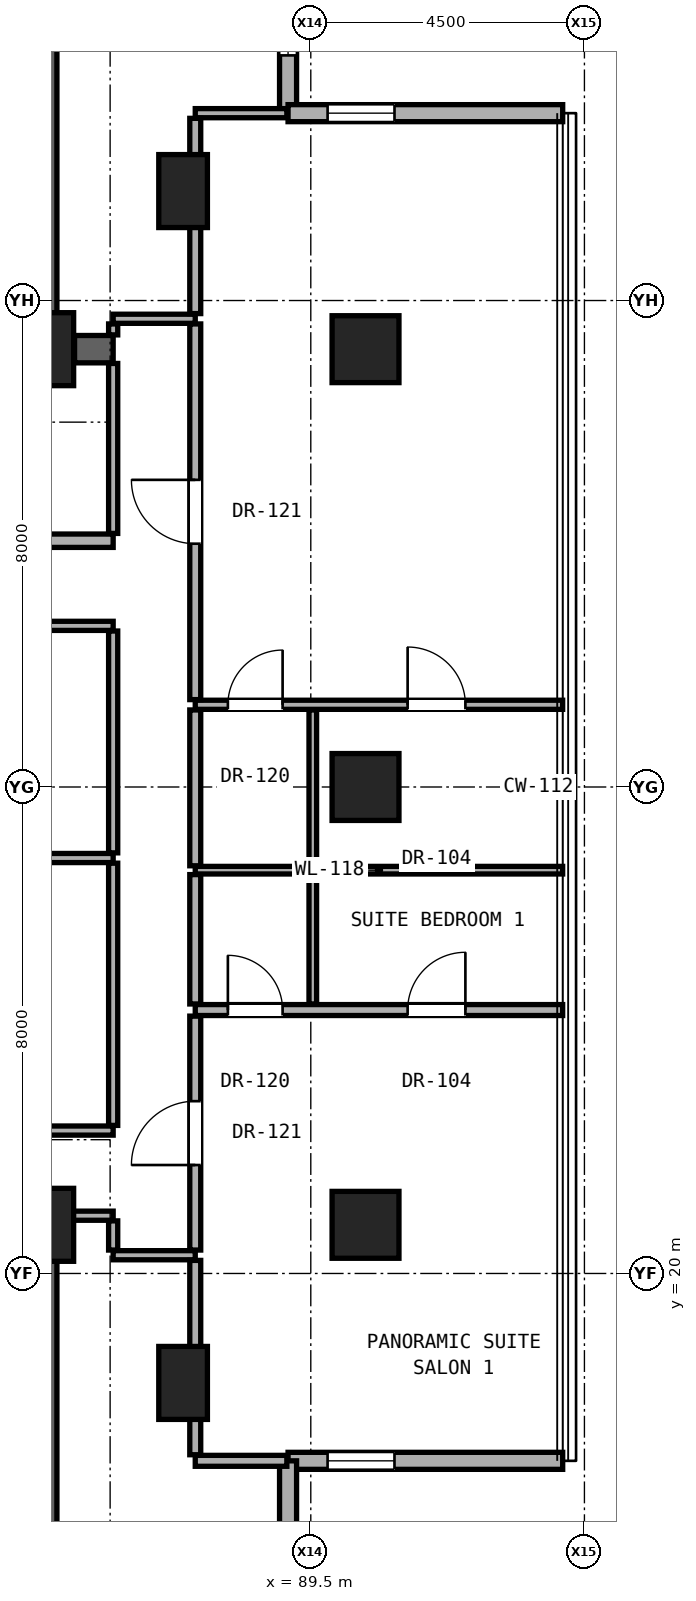
"""IFC4 building model, lengths in metres.
Left out: names, types, materials, properties, quantities, classifications, styles, units other than length and angle.
Written with IfcOpenShell. Run it as: python <this file> out.ifc"""

import sys

from ifc_helpers import new_model, si_unit, direction, frame, frame_2d, origin, origin_2d, place, context, subcontext, project, spatial, rectangle, hollow_rectangle, extrude, element, fill, save


model = new_model("IFC4")
c1 = context("Model", 3, precision=1e-05, world=origin(), true_north=direction((0.0, 1.0)))
c2 = subcontext(c1, "Body", "Model", "MODEL_VIEW")
j1 = project(units=[si_unit("LENGTHUNIT", "METRE"), si_unit("PLANEANGLEUNIT", "RADIAN")], contexts=[c1])
p1 = place(None, origin())
s1 = spatial("IfcSite", under=j1, at=p1, CompositionType="ELEMENT")
p2 = place(p1, origin())
s2 = spatial("IfcBuilding", under=s1, at=p2, CompositionType="ELEMENT")
p3 = place(p2, frame((0.0, 0.0, 88.4)))
s3 = spatial("IfcBuildingStorey", under=s2, at=p3, CompositionType="ELEMENT", Elevation=88.4)
for number, where, z_axis, x_axis in (
    (1, (85.0, 20.8, 0.0), (0.0, 0.0, 1.0), (1.0, 0.0, 0.0)),
    (2, (85.0, 35.2, 0.0), (0.0, 0.0, 1.0), (1.0, 0.0, 0.0)),
):
    element("IfcColumn", number, at=place(p3, frame(where, z_axis=z_axis, x_axis=x_axis)), inside=s3, PredefinedType="COLUMN", context=c2, shape_type="SweptSolid", body=[
        extrude(rectangle(XDim=1.2, YDim=1.2, at=origin_2d()), origin(), (0.0, 0.0, 1.0), 3.3),
    ])
for number, where, z_axis, x_axis in (
    (3, (90.4, 20.8, 0.0), (0.0, 0.0, 1.0), (1.0, 0.0, 0.0)),
    (4, (90.4, 28.0, 0.0), (0.0, 0.0, 1.0), (1.0, 0.0, 0.0)),
    (5, (90.4, 35.2, 0.0), (0.0, 0.0, 1.0), (1.0, 0.0, 0.0)),
):
    element("IfcColumn", number, at=place(p3, frame(where, z_axis=z_axis, x_axis=x_axis)), inside=s3, PredefinedType="COLUMN", context=c2, shape_type="SweptSolid", body=[
        extrude(hollow_rectangle(XDim=1.1, YDim=1.1, WallThickness=0.06, at=origin_2d()), origin(), (0.0, 0.0, 1.0), 3.3),
    ])
for number, where, z_axis, x_axis in (
    (6, (87.4, 18.2, 0.0), (0.0, 0.0, 1.0), (1.0, 0.0, 0.0)),
    (7, (87.4, 37.8, 0.0), (0.0, 0.0, 1.0), (1.0, 0.0, 0.0)),
):
    element("IfcColumn", number, at=place(p3, frame(where, z_axis=z_axis, x_axis=x_axis)), inside=s3, PredefinedType="PILASTER", context=c2, shape_type="SweptSolid", body=[
        extrude(rectangle(XDim=0.8, YDim=1.2, at=origin_2d()), origin(), (0.0, 0.0, 1.0), 3.3),
    ])
for number, where, z_axis, x_axis in (
    (8, (85.0, 35.2, 0.0), (0.0, 0.0, 1.0), (0.0, 1.0, 0.0)),
    (9, (85.0, 15.2, 0.0), (0.0, 0.0, 1.0), (0.0, 1.0, 0.0)),
):
    element("IfcWall", number, at=place(p3, frame(where, z_axis=z_axis, x_axis=x_axis)), inside=s3, PredefinedType="SHEAR", context=c2, shape_type="SweptSolid", body=[
        extrude(rectangle(XDim=5.6, YDim=0.65, at=frame_2d((2.8, 0.0))), origin(), (0.0, 0.0, 1.0), 3.08),
    ])
p4 = place(p3, frame((89.126, 39.081, 0.0), z_axis=(0.0, 0.0, 1.0), x_axis=(0.0, 1.0, 0.0)))
e10 = element("IfcWall", 10, at=p4, inside=s3, PredefinedType="SOLIDWALL", context=c2, shape_type="SweptSolid", body=[
    extrude(rectangle(XDim=4.516, YDim=0.28, at=frame_2d((2.258, 0.0))), origin(), (0.0, 0.0, 1.0), 3.06),
])
p5 = place(p4, frame((0.95, 0.0, 0.85)))
e11 = element("IfcOpeningElement", 11, at=p5, cuts=e10, PredefinedType="OPENING", context=c2, shape_type="SweptSolid", body=[
    extrude(rectangle(XDim=1.1, YDim=2.0, at=frame_2d((0.55, 1.0))), frame((0.0, 0.15, 0.0), z_axis=(0.0, -1.0, 0.0), x_axis=(1.0, 0.0, 0.0)), (0.0, 0.0, 1.0), 0.3),
])
p6 = place(p3, frame((89.126, 16.919, 0.0), z_axis=(0.0, 0.0, 1.0), x_axis=(1.0, 0.0, 0.0)))
e12 = element("IfcWall", 12, at=p6, inside=s3, PredefinedType="SOLIDWALL", context=c2, shape_type="SweptSolid", body=[
    extrude(rectangle(XDim=4.516, YDim=0.28, at=frame_2d((2.258, 0.0))), origin(), (0.0, 0.0, 1.0), 3.06),
])
p7 = place(p6, frame((0.65, 0.0, 0.85)))
e13 = element("IfcOpeningElement", 13, at=p7, cuts=e12, PredefinedType="OPENING", context=c2, shape_type="SweptSolid", body=[
    extrude(rectangle(XDim=1.1, YDim=2.0, at=frame_2d((0.55, 1.0))), frame((0.0, 0.15, 0.0), z_axis=(0.0, -1.0, 0.0), x_axis=(1.0, 0.0, 0.0)), (0.0, 0.0, 1.0), 0.3),
])
p8 = place(p3, frame((89.126, 12.403, 0.0), z_axis=(0.0, 0.0, 1.0), x_axis=(0.0, 1.0, 0.0)))
e14 = element("IfcWall", 14, at=p8, inside=s3, PredefinedType="SOLIDWALL", context=c2, shape_type="SweptSolid", body=[
    extrude(rectangle(XDim=4.516, YDim=0.28, at=frame_2d((2.258, 0.0))), origin(), (0.0, 0.0, 1.0), 3.06),
])
p9 = place(p3, frame((93.643, 39.081, 0.0), z_axis=(0.0, 0.0, 1.0), x_axis=(-1.0, 0.0, 0.0)))
e15 = element("IfcWall", 15, at=p9, inside=s3, PredefinedType="SOLIDWALL", context=c2, shape_type="SweptSolid", body=[
    extrude(rectangle(XDim=4.516, YDim=0.28, at=frame_2d((2.258, 0.0))), origin(), (0.0, 0.0, 1.0), 3.06),
])
p10 = place(p9, frame((2.766, 0.0, 0.85)))
e16 = element("IfcOpeningElement", 16, at=p10, cuts=e15, PredefinedType="OPENING", context=c2, shape_type="SweptSolid", body=[
    extrude(rectangle(XDim=1.1, YDim=2.0, at=frame_2d((0.55, 1.0))), frame((0.0, 0.15, 0.0), z_axis=(0.0, -1.0, 0.0), x_axis=(1.0, 0.0, 0.0)), (0.0, 0.0, 1.0), 0.3),
])
p11 = place(p3, frame((87.6, 16.919, 0.0), z_axis=(0.0, 0.0, 1.0), x_axis=(1.0, 0.0, 0.0)))
e17 = element("IfcWall", 17, at=p11, inside=s3, PredefinedType="PARTITIONING", context=c2, shape_type="SweptSolid", body=[
    extrude(rectangle(XDim=1.506, YDim=0.18, at=frame_2d((0.753, 0.0))), origin(), (0.0, 0.0, 1.0), 3.08),
])
p12 = place(p3, frame((86.25, 20.3, 0.0), z_axis=(0.0, 0.0, 1.0), x_axis=(1.0, 0.0, 0.0)))
e18 = element("IfcWall", 18, at=p12, inside=s3, PredefinedType="PARTITIONING", context=c2, shape_type="SweptSolid", body=[
    extrude(rectangle(XDim=1.35, YDim=0.15, at=frame_2d((0.675, 0.0))), origin(), (0.0, 0.0, 1.0), 3.08),
])
p13 = place(p3, frame((85.32, 20.95, 0.0), z_axis=(0.0, 0.0, 1.0), x_axis=(1.0, 0.0, 0.0)))
e19 = element("IfcWall", 19, at=p13, inside=s3, PredefinedType="PARTITIONING", context=c2, shape_type="SweptSolid", body=[
    extrude(rectangle(XDim=0.93, YDim=0.15, at=frame_2d((0.465, 0.0))), origin(), (0.0, 0.0, 1.0), 2.472),
])
p14 = place(p3, frame((66.62, 22.35, 0.0), z_axis=(0.0, 0.0, 1.0), x_axis=(1.0, 0.0, 0.0)))
e20 = element("IfcWall", 20, at=p14, inside=s3, PredefinedType="PARTITIONING", context=c2, shape_type="SweptSolid", body=[
    extrude(rectangle(XDim=19.63, YDim=0.15, at=frame_2d((9.815, 0.0))), origin(), (0.0, 0.0, 1.0), 2.145),
])
p15 = place(p14, frame((12.085, 0.0, 0.0)))
e21 = element("IfcOpeningElement", 21, at=p15, cuts=e20, PredefinedType="OPENING", context=c2, shape_type="SweptSolid", body=[
    extrude(rectangle(XDim=0.85, YDim=2.01, at=frame_2d((0.425, 1.005))), frame((0.0, 0.085, 0.0), z_axis=(0.0, -1.0, 0.0), x_axis=(1.0, 0.0, 0.0)), (0.0, 0.0, 1.0), 0.17),
])
p16 = place(p3, frame((87.6, 24.332, 0.0), z_axis=(0.0, 0.0, 1.0), x_axis=(1.0, 0.0, 0.0)))
e22 = element("IfcWall", 22, at=p16, inside=s3, PredefinedType="PARTITIONING", context=c2, shape_type="SweptSolid", body=[
    extrude(rectangle(XDim=6.042, YDim=0.18, at=frame_2d((3.021, 0.0))), origin(), (0.0, 0.0, 1.0), 2.216),
])
p17 = place(p16, frame((3.492, 0.0, 0.0)))
e23 = element("IfcOpeningElement", 23, at=p17, cuts=e22, PredefinedType="OPENING", context=c2, shape_type="SweptSolid", body=[
    extrude(rectangle(XDim=0.95, YDim=2.15, at=frame_2d((0.475, 1.075))), frame((0.0, 0.1, 0.0), z_axis=(0.0, -1.0, 0.0), x_axis=(1.0, 0.0, 0.0)), (0.0, 0.0, 1.0), 0.2),
])
p18 = place(p16, frame((0.537, 0.0, 0.0)))
e24 = element("IfcOpeningElement", 24, at=p18, cuts=e22, PredefinedType="OPENING", context=c2, shape_type="SweptSolid", body=[
    extrude(rectangle(XDim=0.9, YDim=2.1, at=frame_2d((0.45, 1.05))), frame((0.0, 0.1, 0.0), z_axis=(0.0, -1.0, 0.0), x_axis=(1.0, 0.0, 0.0)), (0.0, 0.0, 1.0), 0.2),
])
p19 = place(p3, frame((87.6, 26.632, 0.0), z_axis=(0.0, 0.0, 1.0), x_axis=(1.0, 0.0, 0.0)))
e25 = element("IfcWall", 25, at=p19, inside=s3, PredefinedType="PARTITIONING", context=c2, shape_type="SweptSolid", body=[
    extrude(rectangle(XDim=6.042, YDim=0.125, at=frame_2d((3.021, 0.0))), origin(), (0.0, 0.0, 1.0), 2.216),
])
p20 = place(p3, frame((72.05, 26.832, 0.0), z_axis=(0.0, 0.0, 1.0), x_axis=(1.0, 0.0, 0.0)))
e26 = element("IfcWall", 26, at=p20, inside=s3, PredefinedType="PARTITIONING", context=c2, shape_type="SweptSolid", body=[
    extrude(rectangle(XDim=14.2, YDim=0.15, at=frame_2d((7.1, 0.0))), origin(), (0.0, 0.0, 1.0), 2.145),
])
p21 = place(p3, frame((87.6, 29.352, 0.0), z_axis=(0.0, 0.0, 1.0), x_axis=(1.0, 0.0, 0.0)))
e27 = element("IfcWall", 27, at=p21, inside=s3, PredefinedType="PARTITIONING", context=c2, shape_type="SweptSolid", body=[
    extrude(rectangle(XDim=6.042, YDim=0.15, at=frame_2d((3.021, 0.0))), origin(), (0.0, 0.0, 1.0), 2.216),
])
p22 = place(p21, frame((3.492, 0.0, 0.0)))
e28 = element("IfcOpeningElement", 28, at=p22, cuts=e27, PredefinedType="OPENING", context=c2, shape_type="SweptSolid", body=[
    extrude(rectangle(XDim=0.95, YDim=2.15, at=frame_2d((0.475, 1.075))), frame((0.0, 0.085, 0.0), z_axis=(0.0, -1.0, 0.0), x_axis=(1.0, 0.0, 0.0)), (0.0, 0.0, 1.0), 0.17),
])
p23 = place(p21, frame((0.537, 0.0, 0.0)))
e29 = element("IfcOpeningElement", 29, at=p23, cuts=e27, PredefinedType="OPENING", context=c2, shape_type="SweptSolid", body=[
    extrude(rectangle(XDim=0.9, YDim=2.1, at=frame_2d((0.45, 1.05))), frame((0.0, 0.085, 0.0), z_axis=(0.0, -1.0, 0.0), x_axis=(1.0, 0.0, 0.0)), (0.0, 0.0, 1.0), 0.17),
])
p24 = place(p3, frame((66.62, 30.65, 0.0), z_axis=(0.0, 0.0, 1.0), x_axis=(1.0, 0.0, 0.0)))
e30 = element("IfcWall", 30, at=p24, inside=s3, PredefinedType="PARTITIONING", context=c2, shape_type="SweptSolid", body=[
    extrude(rectangle(XDim=19.63, YDim=0.15, at=frame_2d((9.815, 0.0))), origin(), (0.0, 0.0, 1.0), 2.145),
])
p25 = place(p24, frame((3.855, 0.0, 0.0)))
e31 = element("IfcOpeningElement", 31, at=p25, cuts=e30, PredefinedType="OPENING", context=c2, shape_type="SweptSolid", body=[
    extrude(rectangle(XDim=0.85, YDim=2.01, at=frame_2d((0.425, 1.005))), frame((0.0, 0.085, 0.0), z_axis=(0.0, -1.0, 0.0), x_axis=(1.0, 0.0, 0.0)), (0.0, 0.0, 1.0), 0.17),
])
p26 = place(p24, frame((12.085, 0.0, 0.0)))
e32 = element("IfcOpeningElement", 32, at=p26, cuts=e30, PredefinedType="OPENING", context=c2, shape_type="SweptSolid", body=[
    extrude(rectangle(XDim=0.85, YDim=2.01, at=frame_2d((0.425, 1.005))), frame((0.0, 0.085, 0.0), z_axis=(0.0, -1.0, 0.0), x_axis=(1.0, 0.0, 0.0)), (0.0, 0.0, 1.0), 0.17),
])
p27 = place(p3, frame((71.55, 32.05, 0.0), z_axis=(0.0, 0.0, 1.0), x_axis=(1.0, 0.0, 0.0)))
e33 = element("IfcWall", 33, at=p27, inside=s3, PredefinedType="SOLIDWALL", context=c2, shape_type="SweptSolid", body=[
    extrude(rectangle(XDim=14.7, YDim=0.22, at=frame_2d((7.35, 0.0))), origin(), (0.0, 0.0, 1.0), 2.145),
])
p28 = place(p27, frame((11.39, 0.0, 0.0)))
e34 = element("IfcOpeningElement", 34, at=p28, cuts=e33, PredefinedType="OPENING", context=c2, shape_type="SweptSolid", body=[
    extrude(rectangle(XDim=0.85, YDim=2.01, at=frame_2d((0.425, 1.005))), frame((0.0, 0.12, 0.0), z_axis=(0.0, -1.0, 0.0), x_axis=(1.0, 0.0, 0.0)), (0.0, 0.0, 1.0), 0.24),
])
p29 = place(p27, frame((6.065, 0.0, 0.0)))
e35 = element("IfcOpeningElement", 35, at=p29, cuts=e33, PredefinedType="OPENING", context=c2, shape_type="SweptSolid", body=[
    extrude(rectangle(XDim=0.85, YDim=2.01, at=frame_2d((0.425, 1.005))), frame((0.0, 0.12, 0.0), z_axis=(0.0, -1.0, 0.0), x_axis=(1.0, 0.0, 0.0)), (0.0, 0.0, 1.0), 0.24),
])
p30 = place(p27, frame((1.65, 0.0, 0.0)))
e36 = element("IfcOpeningElement", 36, at=p30, cuts=e33, PredefinedType="OPENING", context=c2, shape_type="SweptSolid", body=[
    extrude(rectangle(XDim=0.85, YDim=2.01, at=frame_2d((0.425, 1.005))), frame((0.0, 0.12, 0.0), z_axis=(0.0, -1.0, 0.0), x_axis=(1.0, 0.0, 0.0)), (0.0, 0.0, 1.0), 0.24),
])
p31 = place(p3, frame((85.615, 35.2, 0.0), z_axis=(0.0, 0.0, 1.0), x_axis=(1.0, 0.0, 0.0)))
e37 = element("IfcWall", 37, at=p31, inside=s3, PredefinedType="SHEAR", context=c2, shape_type="SweptSolid", body=[
    extrude(rectangle(XDim=0.635, YDim=0.45, at=frame_2d((0.317, 0.0))), origin(), (0.0, 0.0, 1.0), 3.08),
])
p32 = place(p3, frame((86.25, 35.7, 0.0), z_axis=(0.0, 0.0, 1.0), x_axis=(1.0, 0.0, 0.0)))
e38 = element("IfcWall", 38, at=p32, inside=s3, PredefinedType="PARTITIONING", context=c2, shape_type="SweptSolid", body=[
    extrude(rectangle(XDim=1.35, YDim=0.15, at=frame_2d((0.675, 0.0))), origin(), (0.0, 0.0, 1.0), 3.08),
])
p33 = place(p3, frame((87.6, 39.081, 0.0), z_axis=(0.0, 0.0, 1.0), x_axis=(1.0, 0.0, 0.0)))
e39 = element("IfcWall", 39, at=p33, inside=s3, PredefinedType="PARTITIONING", context=c2, shape_type="SweptSolid", body=[
    extrude(rectangle(XDim=1.506, YDim=0.15, at=frame_2d((0.753, 0.0))), origin(), (0.0, 0.0, 1.0), 3.08),
])
p34 = place(p3, frame((86.25, 20.385, 0.0), z_axis=(0.0, 0.0, 1.0), x_axis=(0.0, 1.0, 0.0)))
e40 = element("IfcWall", 40, at=p34, inside=s3, PredefinedType="PARTITIONING", context=c2, shape_type="SweptSolid", body=[
    extrude(rectangle(XDim=0.48, YDim=0.15, at=frame_2d((0.24, 0.0))), origin(), (0.0, 0.0, 1.0), 2.472),
])
p35 = place(p3, frame((86.25, 22.435, 0.0), z_axis=(0.0, 0.0, 1.0), x_axis=(0.0, 1.0, 0.0)))
e41 = element("IfcWall", 41, at=p35, inside=s3, PredefinedType="PARTITIONING", context=c2, shape_type="SweptSolid", body=[
    extrude(rectangle(XDim=4.312, YDim=0.15, at=frame_2d((2.156, 0.0))), origin(), (0.0, 0.0, 1.0), 3.08),
])
p36 = place(p3, frame((86.25, 26.917, 0.0), z_axis=(0.0, 0.0, 1.0), x_axis=(0.0, 1.0, 0.0)))
e42 = element("IfcWall", 42, at=p36, inside=s3, PredefinedType="PARTITIONING", context=c2, shape_type="SweptSolid", body=[
    extrude(rectangle(XDim=3.648, YDim=0.15, at=frame_2d((1.824, 0.0))), origin(), (0.0, 0.0, 1.0), 2.299),
])
p37 = place(p3, frame((86.25, 32.17, 0.0), z_axis=(0.0, 0.0, 1.0), x_axis=(0.0, 1.0, 0.0)))
e43 = element("IfcWall", 43, at=p37, inside=s3, PredefinedType="PARTITIONING", context=c2, shape_type="SweptSolid", body=[
    extrude(rectangle(XDim=2.795, YDim=0.15, at=frame_2d((1.397, 0.0))), origin(), (0.0, 0.0, 1.0), 2.472),
])
p38 = place(p3, frame((86.25, 35.435, 0.0), z_axis=(0.0, 0.0, 1.0), x_axis=(0.0, 1.0, 0.0)))
e44 = element("IfcWall", 44, at=p38, inside=s3, PredefinedType="PARTITIONING", context=c2, shape_type="SweptSolid", body=[
    extrude(rectangle(XDim=0.18, YDim=0.15, at=frame_2d((0.09, 0.0))), origin(), (0.0, 0.0, 1.0), 2.472),
])
p39 = place(p3, frame((87.6, 17.019, 0.0), z_axis=(0.0, 0.0, 1.0), x_axis=(0.0, 1.0, 0.0)))
e45 = element("IfcWall", 45, at=p39, inside=s3, PredefinedType="PARTITIONING", context=c2, shape_type="SweptSolid", body=[
    extrude(rectangle(XDim=3.196, YDim=0.18, at=frame_2d((1.598, 0.0))), origin(), (0.0, 0.0, 1.0), 2.456),
])
p40 = place(p3, frame((87.6, 20.385, 0.0), z_axis=(0.0, 0.0, 1.0), x_axis=(0.0, 1.0, 0.0)))
e46 = element("IfcWall", 46, at=p40, inside=s3, PredefinedType="PARTITIONING", context=c2, shape_type="SweptSolid", body=[
    extrude(rectangle(XDim=3.847, YDim=0.18, at=frame_2d((1.923, 0.0))), origin(), (0.0, 0.0, 1.0), 2.472),
])
p41 = place(p40, frame((1.398, 0.0, 0.0)))
e47 = element("IfcOpeningElement", 47, at=p41, cuts=e46, PredefinedType="OPENING", context=c2, shape_type="SweptSolid", body=[
    extrude(rectangle(XDim=1.05, YDim=2.2, at=frame_2d((0.525, 1.1))), frame((0.0, 0.1, 0.0), z_axis=(0.0, -1.0, 0.0), x_axis=(1.0, 0.0, 0.0)), (0.0, 0.0, 1.0), 0.2),
])
p42 = place(p3, frame((87.6, 24.432, 0.0), z_axis=(0.0, 0.0, 1.0), x_axis=(0.0, 1.0, 0.0)))
e48 = element("IfcWall", 48, at=p42, inside=s3, PredefinedType="PARTITIONING", context=c2, shape_type="SweptSolid", body=[
    extrude(rectangle(XDim=2.128, YDim=0.18, at=frame_2d((1.064, 0.0))), origin(), (0.0, 0.0, 1.0), 3.08),
])
p43 = place(p3, frame((87.6, 26.705, 0.0), z_axis=(0.0, 0.0, 1.0), x_axis=(0.0, 1.0, 0.0)))
e49 = element("IfcWall", 49, at=p43, inside=s3, PredefinedType="PARTITIONING", context=c2, shape_type="SweptSolid", body=[
    extrude(rectangle(XDim=2.562, YDim=0.18, at=frame_2d((1.281, 0.0))), origin(), (0.0, 0.0, 1.0), 2.299),
])
p44 = place(p3, frame((87.6, 29.437, 0.0), z_axis=(0.0, 0.0, 1.0), x_axis=(0.0, 1.0, 0.0)))
e50 = element("IfcWall", 50, at=p44, inside=s3, PredefinedType="PARTITIONING", context=c2, shape_type="SweptSolid", body=[
    extrude(rectangle(XDim=6.178, YDim=0.18, at=frame_2d((3.089, 0.0))), origin(), (0.0, 0.0, 1.0), 2.472),
])
p45 = place(p44, frame((2.564, 0.0, 0.0)))
e51 = element("IfcOpeningElement", 51, at=p45, cuts=e50, PredefinedType="OPENING", context=c2, shape_type="SweptSolid", body=[
    extrude(rectangle(XDim=1.05, YDim=2.2, at=frame_2d((0.525, 1.1))), frame((0.0, 0.1, 0.0), z_axis=(0.0, -1.0, 0.0), x_axis=(1.0, 0.0, 0.0)), (0.0, 0.0, 1.0), 0.2),
])
p46 = place(p3, frame((87.6, 35.785, 0.0), z_axis=(0.0, 0.0, 1.0), x_axis=(0.0, 1.0, 0.0)))
e52 = element("IfcWall", 52, at=p46, inside=s3, PredefinedType="PARTITIONING", context=c2, shape_type="SweptSolid", body=[
    extrude(rectangle(XDim=3.211, YDim=0.18, at=frame_2d((1.605, 0.0))), origin(), (0.0, 0.0, 1.0), 2.456),
])
p47 = place(p3, frame((89.533, 24.432, 0.0), z_axis=(0.0, 0.0, 1.0), x_axis=(0.0, 1.0, 0.0)))
e53 = element("IfcWall", 53, at=p47, inside=s3, PredefinedType="PARTITIONING", context=c2, shape_type="SweptSolid", body=[
    extrude(rectangle(XDim=2.128, YDim=0.125, at=frame_2d((1.064, 0.0))), origin(), (0.0, 0.0, 1.0), 3.08),
])
p48 = place(p3, frame((89.533, 26.705, 0.0), z_axis=(0.0, 0.0, 1.0), x_axis=(0.0, 1.0, 0.0)))
e54 = element("IfcWall", 54, at=p48, inside=s3, PredefinedType="PARTITIONING", context=c2, shape_type="SweptSolid", body=[
    extrude(rectangle(XDim=2.562, YDim=0.125, at=frame_2d((1.281, 0.0))), origin(), (0.0, 0.0, 1.0), 2.299),
])
p49 = place(p5, origin())
e55 = element("IfcWindow", 55, at=p49, inside=s3, PartitioningType="SINGLE_PANEL", PredefinedType="WINDOW", context=c2, shape_type="SweptSolid", body=[
    extrude(rectangle(XDim=1.1, YDim=2.0, at=frame_2d((0.55, 1.0))), frame((0.0, 0.03, 0.0), z_axis=(0.0, -1.0, 0.0), x_axis=(1.0, 0.0, 0.0)), (0.0, 0.0, 1.0), 0.06),
])
fill(e11, e55)
p50 = place(p7, origin())
e56 = element("IfcWindow", 56, at=p50, inside=s3, PartitioningType="SINGLE_PANEL", PredefinedType="WINDOW", context=c2, shape_type="SweptSolid", body=[
    extrude(rectangle(XDim=1.1, YDim=2.0, at=frame_2d((0.55, 1.0))), frame((0.0, 0.03, 0.0), z_axis=(0.0, -1.0, 0.0), x_axis=(1.0, 0.0, 0.0)), (0.0, 0.0, 1.0), 0.06),
])
fill(e13, e56)
p51 = place(p10, origin())
e57 = element("IfcWindow", 57, at=p51, inside=s3, PartitioningType="SINGLE_PANEL", PredefinedType="WINDOW", context=c2, shape_type="SweptSolid", body=[
    extrude(rectangle(XDim=1.1, YDim=2.0, at=frame_2d((0.55, 1.0))), frame((0.0, 0.03, 0.0), z_axis=(0.0, -1.0, 0.0), x_axis=(1.0, 0.0, 0.0)), (0.0, 0.0, 1.0), 0.06),
])
fill(e16, e57)
p52 = place(p41, origin())
e58 = element("IfcDoor", 58, at=p52, inside=s3, OperationType="SINGLE_SWING_LEFT", PredefinedType="DOOR", context=c2, shape_type="SweptSolid", body=[
    extrude(rectangle(XDim=1.05, YDim=2.2, at=frame_2d((0.525, 1.1))), frame((0.0, 0.025, 0.0), z_axis=(0.0, -1.0, 0.0), x_axis=(1.0, 0.0, 0.0)), (0.0, 0.0, 1.0), 0.05),
])
fill(e47, e58)
p53 = place(p17, origin())
e59 = element("IfcDoor", 59, at=p53, inside=s3, OperationType="SINGLE_SWING_RIGHT", PredefinedType="DOOR", context=c2, shape_type="SweptSolid", body=[
    extrude(rectangle(XDim=0.95, YDim=2.15, at=frame_2d((0.475, 1.075))), frame((0.0, 0.025, 0.0), z_axis=(0.0, -1.0, 0.0), x_axis=(1.0, 0.0, 0.0)), (0.0, 0.0, 1.0), 0.05),
])
fill(e23, e59)
p54 = place(p18, origin())
e60 = element("IfcDoor", 60, at=p54, inside=s3, OperationType="SINGLE_SWING_LEFT", PredefinedType="DOOR", context=c2, shape_type="SweptSolid", body=[
    extrude(rectangle(XDim=0.9, YDim=2.1, at=frame_2d((0.45, 1.05))), frame((0.0, 0.025, 0.0), z_axis=(0.0, -1.0, 0.0), x_axis=(1.0, 0.0, 0.0)), (0.0, 0.0, 1.0), 0.05),
])
fill(e24, e60)
p55 = place(p45, origin())
e61 = element("IfcDoor", 61, at=p55, inside=s3, OperationType="SINGLE_SWING_RIGHT", PredefinedType="DOOR", context=c2, shape_type="SweptSolid", body=[
    extrude(rectangle(XDim=1.05, YDim=2.2, at=frame_2d((0.525, 1.1))), frame((0.0, 0.025, 0.0), z_axis=(0.0, -1.0, 0.0), x_axis=(1.0, 0.0, 0.0)), (0.0, 0.0, 1.0), 0.05),
])
fill(e51, e61)
p56 = place(p22, origin())
e62 = element("IfcDoor", 62, at=p56, inside=s3, OperationType="SINGLE_SWING_LEFT", PredefinedType="DOOR", context=c2, shape_type="SweptSolid", body=[
    extrude(rectangle(XDim=0.95, YDim=2.15, at=frame_2d((0.475, 1.075))), frame((0.0, 0.025, 0.0), z_axis=(0.0, -1.0, 0.0), x_axis=(1.0, 0.0, 0.0)), (0.0, 0.0, 1.0), 0.05),
])
fill(e28, e62)
p57 = place(p23, origin())
e63 = element("IfcDoor", 63, at=p57, inside=s3, OperationType="SINGLE_SWING_RIGHT", PredefinedType="DOOR", context=c2, shape_type="SweptSolid", body=[
    extrude(rectangle(XDim=0.9, YDim=2.1, at=frame_2d((0.45, 1.05))), frame((0.0, 0.025, 0.0), z_axis=(0.0, -1.0, 0.0), x_axis=(1.0, 0.0, 0.0)), (0.0, 0.0, 1.0), 0.05),
])
fill(e29, e63)
save(model, sys.argv[1])
